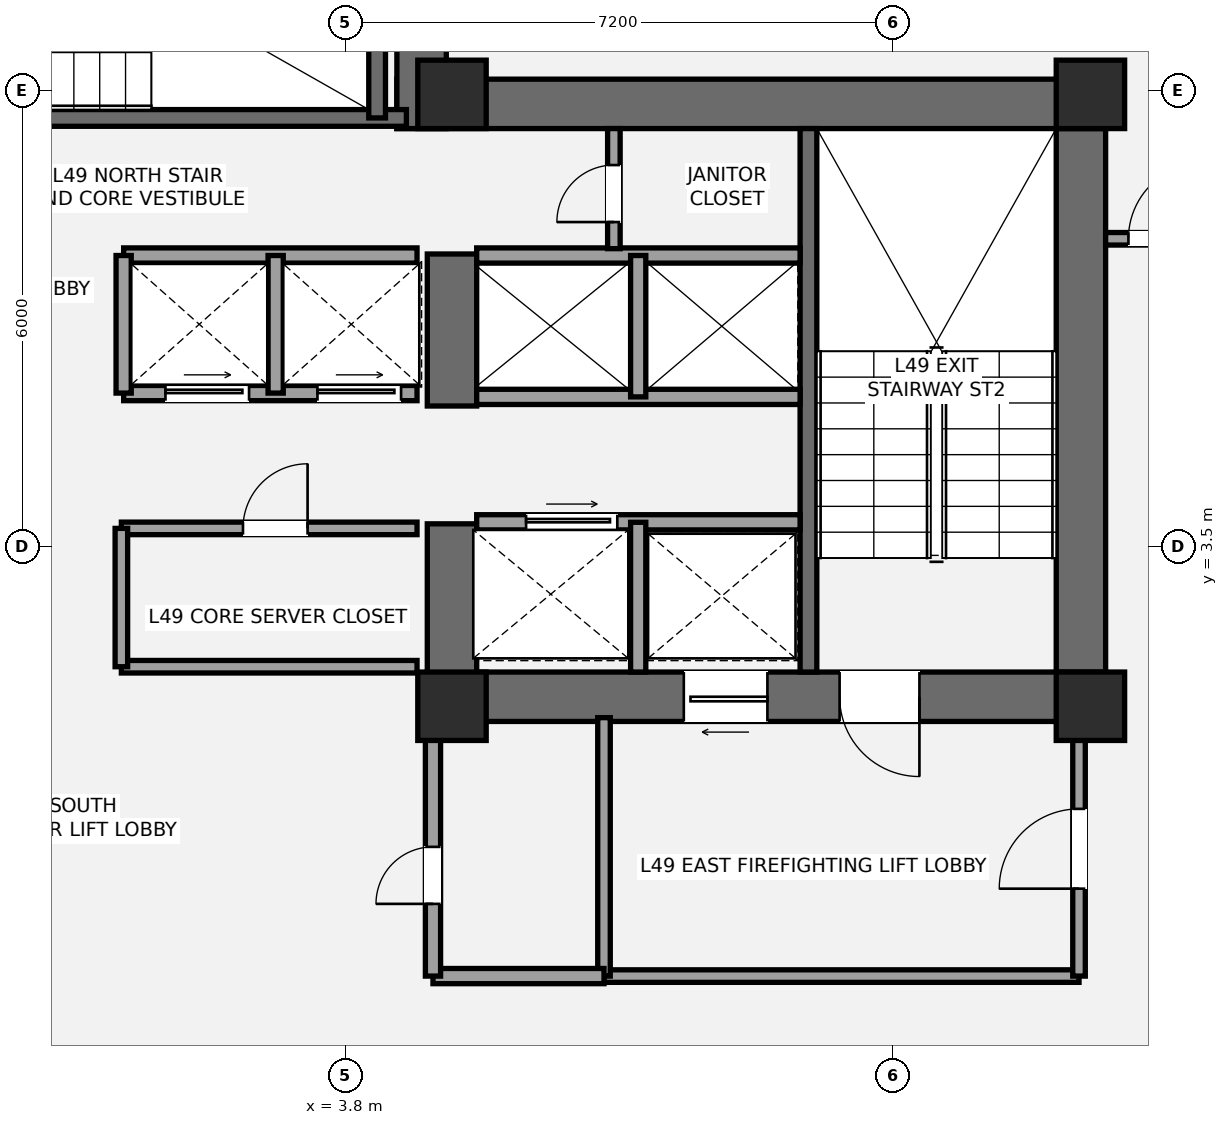
"""IFC4 building model, lengths in metres.
Left out: names, types, materials, properties, quantities, classifications, styles, units other than length and angle.
Written with IfcOpenShell. Run it as: python <this file> out.ifc"""

import sys

from ifc_helpers import new_model, si_unit, direction, frame, frame_2d, origin, origin_2d, place, context, subcontext, project, spatial, rectangle, extrude, element, fill, save


model = new_model("IFC4")
c1 = context("Model", 3, precision=1e-05, world=origin(), true_north=direction((0.0, 1.0)))
c2 = subcontext(c1, "Body", "Model", "MODEL_VIEW")
j1 = project(units=[si_unit("LENGTHUNIT", "METRE"), si_unit("PLANEANGLEUNIT", "RADIAN")], contexts=[c1])
p1 = place(None, origin())
s1 = spatial("IfcSite", under=j1, at=p1, CompositionType="ELEMENT")
p2 = place(p1, origin())
s2 = spatial("IfcBuilding", under=s1, at=p2, CompositionType="ELEMENT")
p3 = place(p2, frame((0.0, 0.0, 179.0)))
s3 = spatial("IfcBuildingStorey", under=s2, at=p3, CompositionType="ELEMENT", Elevation=179.0)
p4 = place(p3, frame((13.475, 1.2, 0.0), z_axis=(0.0, 0.0, 1.0), x_axis=(0.0, 1.0, 0.0)))
e1 = element("IfcWall", 1, at=p4, inside=s3, PredefinedType="SHEAR", context=c2, shape_type="SweptSolid", body=[
    extrude(rectangle(XDim=8.45, YDim=0.65, at=frame_2d((4.225, 0.0))), origin(), (0.0, 0.0, 1.0), 3.2),
])
p5 = place(p3, frame((4.475, 9.325, 0.0), z_axis=(0.0, 0.0, 1.0), x_axis=(1.0, 0.0, 0.0)))
e2 = element("IfcWall", 2, at=p5, inside=s3, PredefinedType="SHEAR", context=c2, shape_type="SweptSolid", body=[
    extrude(rectangle(XDim=9.325, YDim=0.65, at=frame_2d((4.663, 0.0))), origin(), (0.0, 0.0, 1.0), 3.2),
])
p6 = place(p3, frame((13.8, 1.525, 0.0), z_axis=(0.0, 0.0, 1.0), x_axis=(-1.0, 0.0, 0.0)))
e3 = element("IfcWall", 3, at=p6, inside=s3, PredefinedType="SHEAR", context=c2, shape_type="SweptSolid", body=[
    extrude(rectangle(XDim=8.925, YDim=0.65, at=frame_2d((4.462, 0.0))), origin(), (0.0, 0.0, 1.0), 3.2),
])
p7 = place(p6, frame((2.45, 0.0, 0.0)))
e4 = element("IfcOpeningElement", 4, at=p7, cuts=e3, PredefinedType="OPENING", context=c2, shape_type="SweptSolid", body=[
    extrude(rectangle(XDim=1.05, YDim=2.15, at=frame_2d((0.525, 1.075))), frame((0.0, 0.335, 0.0), z_axis=(0.0, -1.0, 0.0), x_axis=(1.0, 0.0, 0.0)), (0.0, 0.0, 1.0), 0.67),
])
p8 = place(p6, frame((4.45, 0.0, 0.0)))
e5 = element("IfcOpeningElement", 5, at=p8, cuts=e3, PredefinedType="OPENING", context=c2, shape_type="SweptSolid", body=[
    extrude(rectangle(XDim=1.1, YDim=2.2, at=frame_2d((0.55, 1.1))), frame((0.0, 0.335, 0.0), z_axis=(0.0, -1.0, 0.0), x_axis=(1.0, 0.0, 0.0)), (0.0, 0.0, 1.0), 0.67),
])
p9 = place(p3, frame((5.2, 1.2, 0.0), z_axis=(0.0, 0.0, 1.0), x_axis=(0.0, 1.0, 0.0)))
e6 = element("IfcWall", 6, at=p9, inside=s3, PredefinedType="SHEAR", context=c2, shape_type="SweptSolid", body=[
    extrude(rectangle(XDim=2.6, YDim=0.65, at=frame_2d((1.3, 0.0))), origin(), (0.0, 0.0, 1.0), 3.2),
])
p10 = place(p3, frame((5.2, 5.35, 0.0), z_axis=(0.0, 0.0, 1.0), x_axis=(0.0, 1.0, 0.0)))
e7 = element("IfcWall", 7, at=p10, inside=s3, PredefinedType="SHEAR", context=c2, shape_type="SweptSolid", body=[
    extrude(rectangle(XDim=2.0, YDim=0.65, at=frame_2d((1.0, 0.0))), origin(), (0.0, 0.0, 1.0), 3.2),
])
p11 = place(p3, frame((9.89, 1.85, 0.0), z_axis=(0.0, 0.0, 1.0), x_axis=(0.0, 1.0, 0.0)))
e8 = element("IfcWall", 8, at=p11, inside=s3, PredefinedType="SHEAR", context=c2, shape_type="SweptSolid", body=[
    extrude(rectangle(XDim=7.15, YDim=0.22, at=frame_2d((3.575, 0.0))), origin(), (0.0, 0.0, 1.0), 3.2),
])
p12 = place(p3, frame((4.8, 9.0, 0.0), z_axis=(0.0, 0.0, 1.0), x_axis=(0.0, 1.0, 0.0)))
e9 = element("IfcWall", 9, at=p12, inside=s3, PredefinedType="SHEAR", context=c2, shape_type="SweptSolid", body=[
    extrude(rectangle(XDim=4.05, YDim=0.65, at=frame_2d((2.025, 0.0))), origin(), (0.0, 0.0, 1.0), 3.2),
])
p13 = place(p3, frame((-4.7, 9.14, 0.0), z_axis=(0.0, 0.0, 1.0), x_axis=(1.0, 0.0, 0.0)))
e10 = element("IfcWall", 10, at=p13, inside=s3, PredefinedType="SHEAR", context=c2, shape_type="SweptSolid", body=[
    extrude(rectangle(XDim=9.3, YDim=0.22, at=frame_2d((4.65, 0.0))), origin(), (0.0, 0.0, 1.0), 3.2),
])
p14 = place(p13, frame((1.15, 0.0, 0.0)))
e11 = element("IfcOpeningElement", 11, at=p14, cuts=e10, PredefinedType="OPENING", context=c2, shape_type="SweptSolid", body=[
    extrude(rectangle(XDim=1.05, YDim=2.15, at=frame_2d((0.525, 1.075))), frame((0.0, 0.12, 0.0), z_axis=(0.0, -1.0, 0.0), x_axis=(1.0, 0.0, 0.0)), (0.0, 0.0, 1.0), 0.24),
])
p15 = place(p3, frame((4.215, 9.14, 0.0), z_axis=(0.0, 0.0, 1.0), x_axis=(0.0, 1.0, 0.0)))
e12 = element("IfcWall", 12, at=p15, inside=s3, PredefinedType="SHEAR", context=c2, shape_type="SweptSolid", body=[
    extrude(rectangle(XDim=3.26, YDim=0.22, at=frame_2d((1.63, 0.0))), origin(), (0.0, 0.0, 1.0), 3.2),
])
for number, where, z_axis, x_axis in (
    (13, (5.2, 1.4, 0.0), (0.0, 0.0, 1.0), (1.0, 0.0, 0.0)),
    (14, (5.2, 9.45, 0.0), (0.0, 0.0, 1.0), (1.0, 0.0, 0.0)),
    (15, (13.6, 1.4, 0.0), (0.0, 0.0, 1.0), (1.0, 0.0, 0.0)),
    (16, (13.6, 9.45, 0.0), (0.0, 0.0, 1.0), (1.0, 0.0, 0.0)),
):
    element("IfcColumn", number, at=place(p3, frame(where, z_axis=z_axis, x_axis=x_axis)), inside=s3, PredefinedType="COLUMN", context=c2, shape_type="SweptSolid", body=[
        extrude(rectangle(XDim=0.9, YDim=0.9, at=origin_2d()), origin(), (0.0, 0.0, 1.0), 3.2),
    ])
p16 = place(p3, frame((7.2, -2.15, 0.0), z_axis=(0.0, 0.0, 1.0), x_axis=(1.0, 0.0, 0.0)))
e17 = element("IfcWall", 17, at=p16, inside=s3, PredefinedType="PARTITIONING", context=c2, shape_type="SweptSolid", body=[
    extrude(rectangle(XDim=6.25, YDim=0.165, at=frame_2d((3.125, 0.0))), origin(), (0.0, 0.0, 1.0), 3.02),
])
p17 = place(p3, frame((7.2, -2.15, 0.0), z_axis=(0.0, 0.0, 1.0), x_axis=(0.0, 1.0, 0.0)))
e18 = element("IfcWall", 18, at=p17, inside=s3, PredefinedType="PARTITIONING", context=c2, shape_type="SweptSolid", body=[
    extrude(rectangle(XDim=3.4, YDim=0.165, at=frame_2d((1.7, 0.0))), origin(), (0.0, 0.0, 1.0), 2.473),
])
p18 = place(p3, frame((13.45, -2.15, 0.0), z_axis=(0.0, 0.0, 1.0), x_axis=(0.0, 1.0, 0.0)))
e19 = element("IfcWall", 19, at=p18, inside=s3, PredefinedType="PARTITIONING", context=c2, shape_type="SweptSolid", body=[
    extrude(rectangle(XDim=3.4, YDim=0.165, at=frame_2d((1.7, 0.0))), origin(), (0.0, 0.0, 1.0), 2.473),
])
p19 = place(p18, frame((1.15, 0.0, 0.0)))
e20 = element("IfcOpeningElement", 20, at=p19, cuts=e19, PredefinedType="OPENING", context=c2, shape_type="SweptSolid", body=[
    extrude(rectangle(XDim=1.05, YDim=2.15, at=frame_2d((0.525, 1.075))), frame((0.0, 0.093, 0.0), z_axis=(0.0, -1.0, 0.0), x_axis=(1.0, 0.0, 0.0)), (0.0, 0.0, 1.0), 0.185),
])
p20 = place(p3, frame((4.95, -2.15, 0.0), z_axis=(0.0, 0.0, 1.0), x_axis=(1.0, 0.0, 0.0)))
e21 = element("IfcWall", 21, at=p20, inside=s3, PredefinedType="SOLIDWALL", context=c2, shape_type="SweptSolid", body=[
    extrude(rectangle(XDim=2.25, YDim=0.2, at=frame_2d((1.125, 0.0))), origin(), (0.0, 0.0, 1.0), 3.02),
])
p21 = place(p3, frame((4.95, -2.15, 0.0), z_axis=(0.0, 0.0, 1.0), x_axis=(0.0, 1.0, 0.0)))
e22 = element("IfcWall", 22, at=p21, inside=s3, PredefinedType="SOLIDWALL", context=c2, shape_type="SweptSolid", body=[
    extrude(rectangle(XDim=3.4, YDim=0.2, at=frame_2d((1.7, 0.0))), origin(), (0.0, 0.0, 1.0), 2.473),
])
p22 = place(p21, frame((0.95, 0.0, 0.0)))
e23 = element("IfcOpeningElement", 23, at=p22, cuts=e22, PredefinedType="OPENING", context=c2, shape_type="SweptSolid", body=[
    extrude(rectangle(XDim=0.75, YDim=2.1, at=frame_2d((0.375, 1.05))), frame((0.0, 0.11, 0.0), z_axis=(0.0, -1.0, 0.0), x_axis=(1.0, 0.0, 0.0)), (0.0, 0.0, 1.0), 0.22),
])
p23 = place(p3, frame((5.525, 3.82, 0.0), z_axis=(0.0, 0.0, 1.0), x_axis=(1.0, 0.0, 0.0)))
e24 = element("IfcWall", 24, at=p23, inside=s3, PredefinedType="SOLIDWALL", context=c2, shape_type="SweptSolid", body=[
    extrude(rectangle(XDim=4.255, YDim=0.2, at=frame_2d((2.127, 0.0))), origin(), (0.0, 0.0, 1.0), 3.02),
])
p24 = place(p23, frame((0.65, 0.0, 0.0)))
e25 = element("IfcOpeningElement", 25, at=p24, cuts=e24, PredefinedType="OPENING", context=c2, shape_type="SweptSolid", body=[
    extrude(rectangle(XDim=1.2, YDim=2.2, at=frame_2d((0.6, 1.1))), frame((0.0, 0.11, 0.0), z_axis=(0.0, -1.0, 0.0), x_axis=(1.0, 0.0, 0.0)), (0.0, 0.0, 1.0), 0.22),
])
p25 = place(p3, frame((7.65, 1.85, 0.0), z_axis=(0.0, 0.0, 1.0), x_axis=(0.0, 1.0, 0.0)))
e26 = element("IfcWall", 26, at=p25, inside=s3, PredefinedType="SOLIDWALL", context=c2, shape_type="SweptSolid", body=[
    extrude(rectangle(XDim=1.97, YDim=0.2, at=frame_2d((0.985, 0.0))), origin(), (0.0, 0.0, 1.0), 3.02),
])
for number, where, z_axis, x_axis in (
    (27, (5.525, 5.47, 0.0), (0.0, 0.0, 1.0), (1.0, 0.0, 0.0)),
    (28, (5.525, 7.33, 0.0), (0.0, 0.0, 1.0), (1.0, 0.0, 0.0)),
):
    element("IfcWall", number, at=place(p3, frame(where, z_axis=z_axis, x_axis=x_axis)), inside=s3, PredefinedType="SOLIDWALL", context=c2, shape_type="SweptSolid", body=[
        extrude(rectangle(XDim=4.255, YDim=0.2, at=frame_2d((2.127, 0.0))), origin(), (0.0, 0.0, 1.0), 3.02),
    ])
p26 = place(p3, frame((7.65, 5.47, 0.0), z_axis=(0.0, 0.0, 1.0), x_axis=(0.0, 1.0, 0.0)))
e29 = element("IfcWall", 29, at=p26, inside=s3, PredefinedType="SOLIDWALL", context=c2, shape_type="SweptSolid", body=[
    extrude(rectangle(XDim=1.86, YDim=0.2, at=frame_2d((0.93, 0.0))), origin(), (0.0, 0.0, 1.0), 3.02),
])
p27 = place(p3, frame((0.85, 1.92, 0.0), z_axis=(0.0, 0.0, 1.0), x_axis=(1.0, 0.0, 0.0)))
e30 = element("IfcWall", 30, at=p27, inside=s3, PredefinedType="PARTITIONING", context=c2, shape_type="SweptSolid", body=[
    extrude(rectangle(XDim=3.89, YDim=0.165, at=frame_2d((1.945, 0.0))), origin(), (0.0, 0.0, 1.0), 2.16),
])
p28 = place(p3, frame((0.85, 3.74, 0.0), z_axis=(0.0, 0.0, 1.0), x_axis=(1.0, 0.0, 0.0)))
e31 = element("IfcWall", 31, at=p28, inside=s3, PredefinedType="PARTITIONING", context=c2, shape_type="SweptSolid", body=[
    extrude(rectangle(XDim=3.89, YDim=0.165, at=frame_2d((1.945, 0.0))), origin(), (0.0, 0.0, 1.0), 3.02),
])
p29 = place(p28, frame((1.6, 0.0, 0.0)))
e32 = element("IfcOpeningElement", 32, at=p29, cuts=e31, PredefinedType="OPENING", context=c2, shape_type="SweptSolid", body=[
    extrude(rectangle(XDim=0.85, YDim=2.1, at=frame_2d((0.425, 1.05))), frame((0.0, 0.093, 0.0), z_axis=(0.0, -1.0, 0.0), x_axis=(1.0, 0.0, 0.0)), (0.0, 0.0, 1.0), 0.185),
])
p30 = place(p3, frame((0.85, 1.92, 0.0), z_axis=(0.0, 0.0, 1.0), x_axis=(0.0, 1.0, 0.0)))
e33 = element("IfcWall", 33, at=p30, inside=s3, PredefinedType="PARTITIONING", context=c2, shape_type="SweptSolid", body=[
    extrude(rectangle(XDim=1.82, YDim=0.165, at=frame_2d((0.91, 0.0))), origin(), (0.0, 0.0, 1.0), 3.02),
])
p31 = place(p3, frame((0.88, 5.52, 0.0), z_axis=(0.0, 0.0, 1.0), x_axis=(1.0, 0.0, 0.0)))
e34 = element("IfcWall", 34, at=p31, inside=s3, PredefinedType="SOLIDWALL", context=c2, shape_type="SweptSolid", body=[
    extrude(rectangle(XDim=3.86, YDim=0.2, at=frame_2d((1.93, 0.0))), origin(), (0.0, 0.0, 1.0), 3.02),
])
p32 = place(p31, frame((0.55, 0.0, 0.0)))
e35 = element("IfcOpeningElement", 35, at=p32, cuts=e34, PredefinedType="OPENING", context=c2, shape_type="SweptSolid", body=[
    extrude(rectangle(XDim=1.1, YDim=2.2, at=frame_2d((0.55, 1.1))), frame((0.0, 0.11, 0.0), z_axis=(0.0, -1.0, 0.0), x_axis=(1.0, 0.0, 0.0)), (0.0, 0.0, 1.0), 0.22),
])
p33 = place(p31, frame((2.55, 0.0, 0.0)))
e36 = element("IfcOpeningElement", 36, at=p33, cuts=e34, PredefinedType="OPENING", context=c2, shape_type="SweptSolid", body=[
    extrude(rectangle(XDim=1.1, YDim=2.2, at=frame_2d((0.55, 1.1))), frame((0.0, 0.11, 0.0), z_axis=(0.0, -1.0, 0.0), x_axis=(1.0, 0.0, 0.0)), (0.0, 0.0, 1.0), 0.22),
])
p34 = place(p3, frame((0.88, 7.33, 0.0), z_axis=(0.0, 0.0, 1.0), x_axis=(1.0, 0.0, 0.0)))
e37 = element("IfcWall", 37, at=p34, inside=s3, PredefinedType="SOLIDWALL", context=c2, shape_type="SweptSolid", body=[
    extrude(rectangle(XDim=3.86, YDim=0.2, at=frame_2d((1.93, 0.0))), origin(), (0.0, 0.0, 1.0), 3.02),
])
for number, where, z_axis, x_axis in (
    (38, (2.88, 5.52, 0.0), (0.0, 0.0, 1.0), (0.0, 1.0, 0.0)),
    (39, (0.88, 5.52, 0.0), (0.0, 0.0, 1.0), (0.0, 1.0, 0.0)),
):
    element("IfcWall", number, at=place(p3, frame(where, z_axis=z_axis, x_axis=x_axis)), inside=s3, PredefinedType="SOLIDWALL", context=c2, shape_type="SweptSolid", body=[
        extrude(rectangle(XDim=1.81, YDim=0.2, at=frame_2d((0.905, 0.0))), origin(), (0.0, 0.0, 1.0), 3.02),
    ])
p35 = place(p3, frame((7.33, 7.42, 0.0), z_axis=(0.0, 0.0, 1.0), x_axis=(0.0, 1.0, 0.0)))
e40 = element("IfcWall", 40, at=p35, inside=s3, PredefinedType="PARTITIONING", context=c2, shape_type="SweptSolid", body=[
    extrude(rectangle(XDim=1.58, YDim=0.165, at=frame_2d((0.79, 0.0))), origin(), (0.0, 0.0, 1.0), 3.02),
])
p36 = place(p35, frame((0.35, 0.0, 0.0)))
e41 = element("IfcOpeningElement", 41, at=p36, cuts=e40, PredefinedType="OPENING", context=c2, shape_type="SweptSolid", body=[
    extrude(rectangle(XDim=0.75, YDim=2.1, at=frame_2d((0.375, 1.05))), frame((0.0, 0.093, 0.0), z_axis=(0.0, -1.0, 0.0), x_axis=(1.0, 0.0, 0.0)), (0.0, 0.0, 1.0), 0.185),
])
p37 = place(p3, frame((13.8, 7.55, 0.0), z_axis=(0.0, 0.0, 1.0), x_axis=(1.0, 0.0, 0.0)))
e42 = element("IfcWall", 42, at=p37, inside=s3, PredefinedType="PARTITIONING", context=c2, shape_type="SweptSolid", body=[
    extrude(rectangle(XDim=1.75, YDim=0.165, at=frame_2d((0.875, 0.0))), origin(), (0.0, 0.0, 1.0), 3.02),
])
p38 = place(p37, frame((0.3, 0.0, 0.0)))
e43 = element("IfcOpeningElement", 43, at=p38, cuts=e42, PredefinedType="OPENING", context=c2, shape_type="SweptSolid", body=[
    extrude(rectangle(XDim=1.0, YDim=2.15, at=frame_2d((0.5, 1.075))), frame((0.0, 0.093, 0.0), z_axis=(0.0, -1.0, 0.0), x_axis=(1.0, 0.0, 0.0)), (0.0, 0.0, 1.0), 0.185),
])
p39 = place(p7, origin())
e44 = element("IfcDoor", 44, at=p39, inside=s3, OperationType="SINGLE_SWING_LEFT", PredefinedType="DOOR", context=c2, shape_type="SweptSolid", body=[
    extrude(rectangle(XDim=1.05, YDim=2.15, at=frame_2d((0.525, 1.075))), frame((0.0, 0.025, 0.0), z_axis=(0.0, -1.0, 0.0), x_axis=(1.0, 0.0, 0.0)), (0.0, 0.0, 1.0), 0.05),
])
fill(e4, e44)
p40 = place(p19, origin())
e45 = element("IfcDoor", 45, at=p40, inside=s3, OperationType="SINGLE_SWING_LEFT", PredefinedType="DOOR", context=c2, shape_type="SweptSolid", body=[
    extrude(rectangle(XDim=1.05, YDim=2.15, at=frame_2d((0.525, 1.075))), frame((0.0, 0.025, 0.0), z_axis=(0.0, -1.0, 0.0), x_axis=(1.0, 0.0, 0.0)), (0.0, 0.0, 1.0), 0.05),
])
fill(e20, e45)
p41 = place(p22, origin())
e46 = element("IfcDoor", 46, at=p41, inside=s3, OperationType="SINGLE_SWING_LEFT", PredefinedType="DOOR", context=c2, shape_type="SweptSolid", body=[
    extrude(rectangle(XDim=0.75, YDim=2.1, at=frame_2d((0.375, 1.05))), frame((0.0, 0.025, 0.0), z_axis=(0.0, -1.0, 0.0), x_axis=(1.0, 0.0, 0.0)), (0.0, 0.0, 1.0), 0.05),
])
fill(e23, e46)
p42 = place(p8, origin())
e47 = element("IfcDoor", 47, at=p42, inside=s3, OperationType="SLIDING_TO_LEFT", PredefinedType="DOOR", context=c2, shape_type="SweptSolid", body=[
    extrude(rectangle(XDim=1.1, YDim=2.2, at=frame_2d((0.55, 1.1))), frame((0.0, 0.025, 0.0), z_axis=(0.0, -1.0, 0.0), x_axis=(1.0, 0.0, 0.0)), (0.0, 0.0, 1.0), 0.05),
])
fill(e5, e47)
p43 = place(p24, origin())
e48 = element("IfcDoor", 48, at=p43, inside=s3, OperationType="SLIDING_TO_RIGHT", PredefinedType="DOOR", context=c2, shape_type="SweptSolid", body=[
    extrude(rectangle(XDim=1.2, YDim=2.2, at=frame_2d((0.6, 1.1))), frame((0.0, 0.025, 0.0), z_axis=(0.0, -1.0, 0.0), x_axis=(1.0, 0.0, 0.0)), (0.0, 0.0, 1.0), 0.05),
])
fill(e25, e48)
p44 = place(p29, origin())
e49 = element("IfcDoor", 49, at=p44, inside=s3, OperationType="SINGLE_SWING_RIGHT", PredefinedType="DOOR", context=c2, shape_type="SweptSolid", body=[
    extrude(rectangle(XDim=0.85, YDim=2.1, at=frame_2d((0.425, 1.05))), frame((0.0, 0.025, 0.0), z_axis=(0.0, -1.0, 0.0), x_axis=(1.0, 0.0, 0.0)), (0.0, 0.0, 1.0), 0.05),
])
fill(e32, e49)
p45 = place(p32, origin())
e50 = element("IfcDoor", 50, at=p45, inside=s3, OperationType="SLIDING_TO_LEFT", PredefinedType="DOOR", context=c2, shape_type="SweptSolid", body=[
    extrude(rectangle(XDim=1.1, YDim=2.2, at=frame_2d((0.55, 1.1))), frame((0.0, 0.025, 0.0), z_axis=(0.0, -1.0, 0.0), x_axis=(1.0, 0.0, 0.0)), (0.0, 0.0, 1.0), 0.05),
])
fill(e35, e50)
p46 = place(p33, origin())
e51 = element("IfcDoor", 51, at=p46, inside=s3, OperationType="SLIDING_TO_LEFT", PredefinedType="DOOR", context=c2, shape_type="SweptSolid", body=[
    extrude(rectangle(XDim=1.1, YDim=2.2, at=frame_2d((0.55, 1.1))), frame((0.0, 0.025, 0.0), z_axis=(0.0, -1.0, 0.0), x_axis=(1.0, 0.0, 0.0)), (0.0, 0.0, 1.0), 0.05),
])
fill(e36, e51)
p47 = place(p36, origin())
e52 = element("IfcDoor", 52, at=p47, inside=s3, OperationType="SINGLE_SWING_LEFT", PredefinedType="DOOR", context=c2, shape_type="SweptSolid", body=[
    extrude(rectangle(XDim=0.75, YDim=2.1, at=frame_2d((0.375, 1.05))), frame((0.0, 0.025, 0.0), z_axis=(0.0, -1.0, 0.0), x_axis=(1.0, 0.0, 0.0)), (0.0, 0.0, 1.0), 0.05),
])
fill(e41, e52)
p48 = place(p38, origin())
e53 = element("IfcDoor", 53, at=p48, inside=s3, OperationType="SINGLE_SWING_RIGHT", PredefinedType="DOOR", context=c2, shape_type="SweptSolid", body=[
    extrude(rectangle(XDim=1.0, YDim=2.15, at=frame_2d((0.5, 1.075))), frame((0.0, 0.025, 0.0), z_axis=(0.0, -1.0, 0.0), x_axis=(1.0, 0.0, 0.0)), (0.0, 0.0, 1.0), 0.05),
])
fill(e43, e53)
save(model, sys.argv[1])
